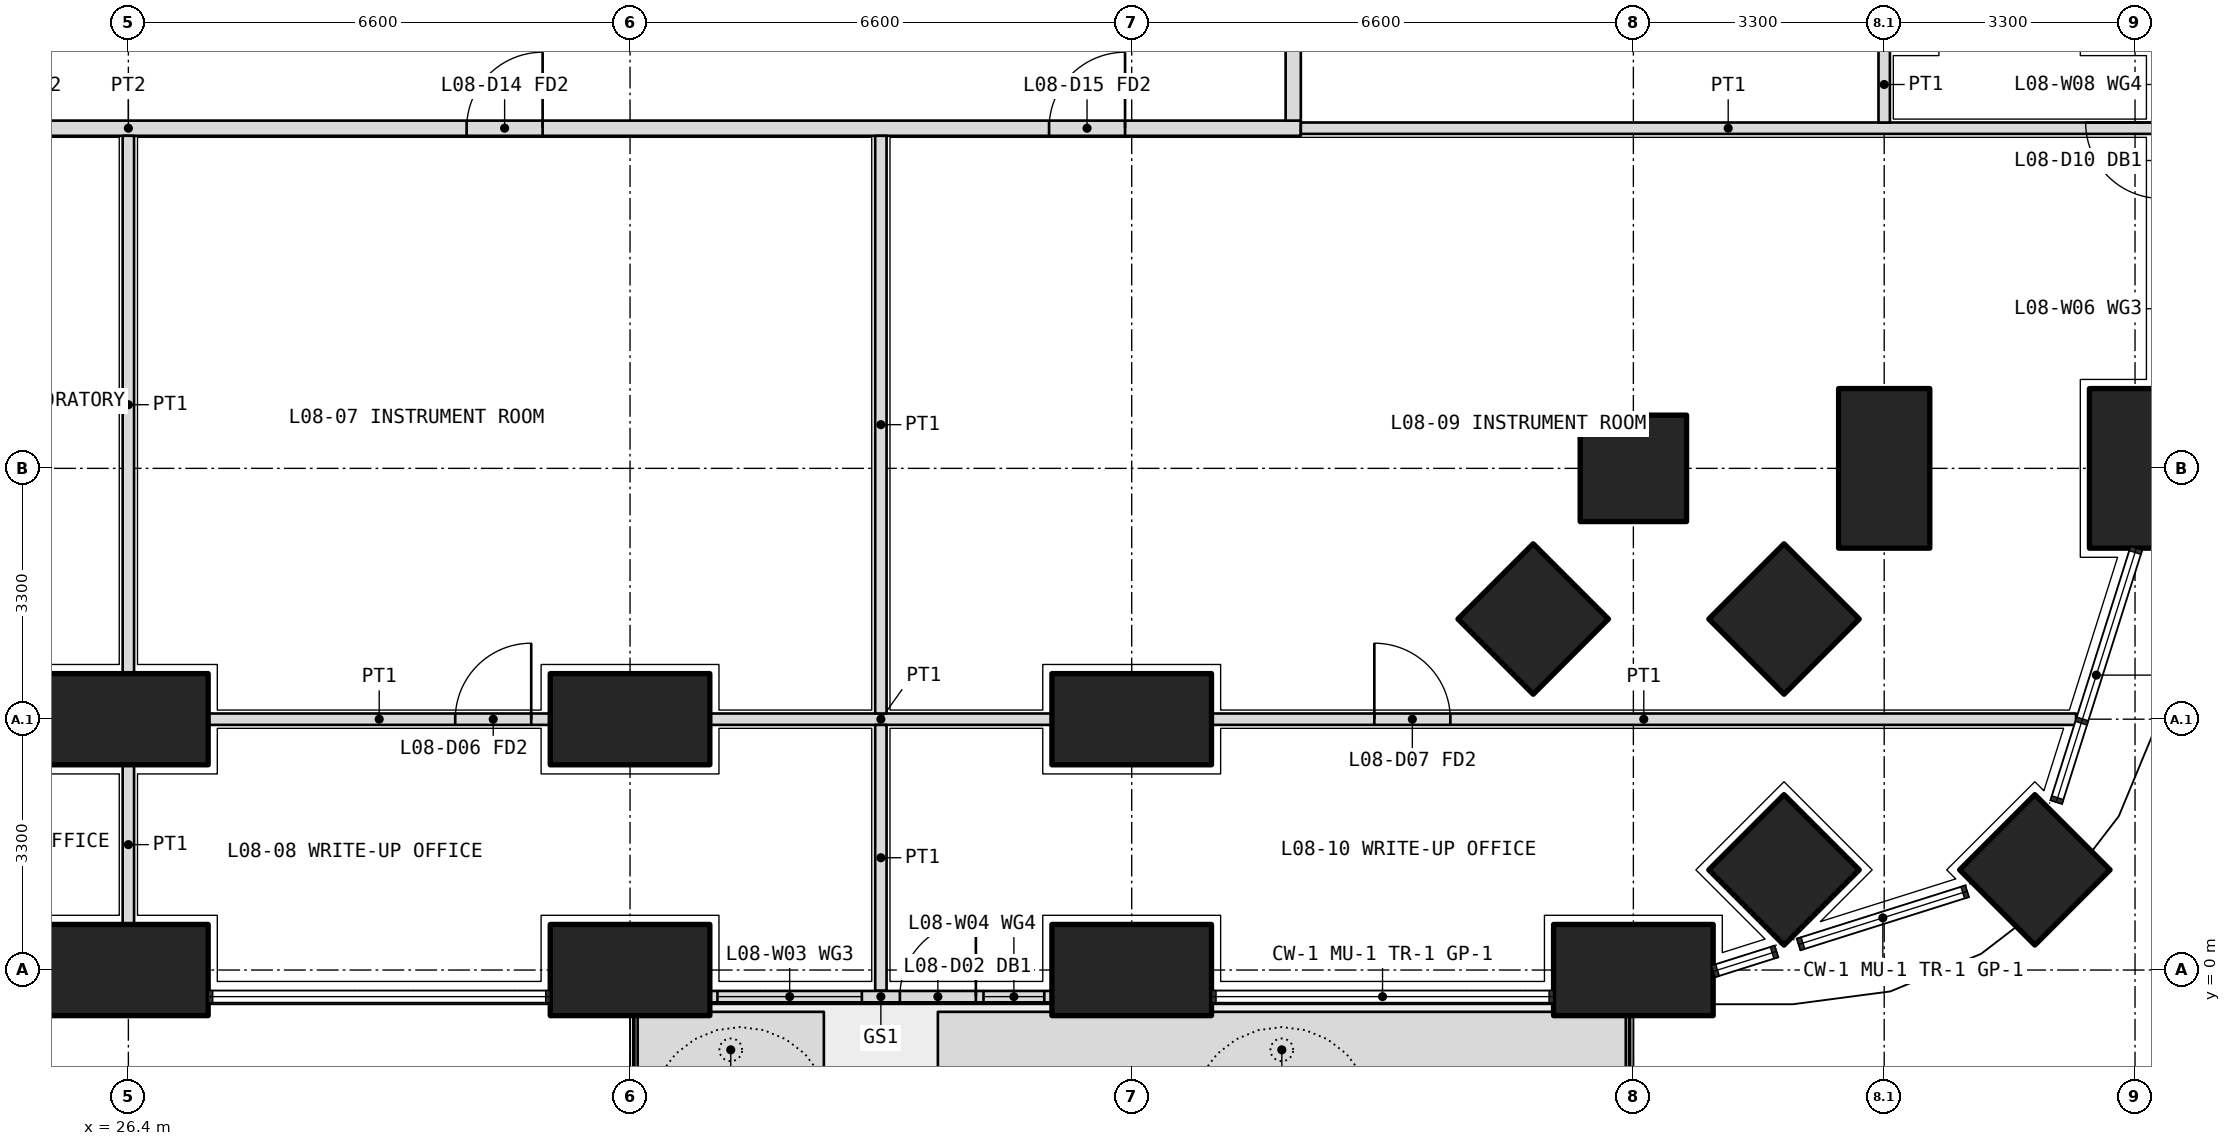
"""IFC4 building model, lengths in metres.
Left out: names, types, materials, properties, quantities, classifications, styles, units other than length and angle.
Written with IfcOpenShell. Run it as: python <this file> out.ifc"""

import sys

from ifc_helpers import new_model, si_unit, direction, frame, frame_2d, origin, origin_2d, place, context, subcontext, project, spatial, polyline, rectangle, outline, extrude, element, fill, save


model = new_model("IFC4")
c1 = context("Model", 3, precision=1e-05, world=origin(), true_north=direction((0.0, 1.0)))
c2 = subcontext(c1, "Body", "Model", "MODEL_VIEW")
j1 = project(units=[si_unit("LENGTHUNIT", "METRE"), si_unit("PLANEANGLEUNIT", "RADIAN")], contexts=[c1])
p1 = place(None, origin())
s1 = spatial("IfcSite", under=j1, at=p1, CompositionType="ELEMENT")
p2 = place(p1, origin())
s2 = spatial("IfcBuilding", under=s1, at=p2, CompositionType="ELEMENT")
p3 = place(p2, frame((0.0, 0.0, 38.1)))
s3 = spatial("IfcBuildingStorey", under=s2, at=p3, CompositionType="ELEMENT", Elevation=38.1)
p4 = place(p3, frame((51.482, 1.318, 0.0), z_axis=(0.0, 0.0, 1.0), x_axis=(0.707106781187, 0.707106781187, 0.0)))
e1 = element("IfcColumn", 1, at=p4, inside=s3, PredefinedType="COLUMN", context=c2, shape_type="SweptSolid", body=[
    extrude(rectangle(XDim=1.4, YDim=1.4, at=origin_2d()), origin(), (0.0, 0.0, 1.0), 4.2),
])
for number, where, z_axis, x_axis in (
    (2, (26.4, 0.0, 0.0), (0.0, 0.0, 1.0), (1.0, 0.0, 0.0)),
    (3, (33.0, 0.0, 0.0), (0.0, 0.0, 1.0), (1.0, 0.0, 0.0)),
    (4, (39.6, 0.0, 0.0), (0.0, 0.0, 1.0), (1.0, 0.0, 0.0)),
    (5, (46.2, 0.0, 0.0), (0.0, 0.0, 1.0), (1.0, 0.0, 0.0)),
    (6, (52.8, 6.6, 0.0), (0.0, 0.0, 1.0), (0.0, 1.0, 0.0)),
):
    element("IfcColumn", number, at=place(p3, frame(where, z_axis=z_axis, x_axis=x_axis)), inside=s3, PredefinedType="COLUMN", context=c2, shape_type="SweptSolid", body=[
        extrude(rectangle(XDim=2.1, YDim=1.2, at=origin_2d()), origin(), (0.0, 0.0, 1.0), 4.2),
    ])
for number, where, z_axis, x_axis in (
    (7, (46.2, 6.6, 0.0), (0.0, 0.0, 1.0), (1.0, 0.0, 0.0)),
    (8, (48.182, 1.318, 0.0), (0.0, 0.0, 1.0), (0.707, 0.707, 0.0)),
):
    element("IfcColumn", number, at=place(p3, frame(where, z_axis=z_axis, x_axis=x_axis)), inside=s3, PredefinedType="COLUMN", context=c2, shape_type="SweptSolid", body=[
        extrude(rectangle(XDim=1.4, YDim=1.4, at=origin_2d()), origin(), (0.0, 0.0, 1.0), 4.2),
    ])
p5 = place(p3, frame((49.5, 6.6, 0.0), z_axis=(0.0, 0.0, 1.0), x_axis=(0.0, 1.0, 0.0)))
e9 = element("IfcColumn", 9, at=p5, inside=s3, PredefinedType="COLUMN", context=c2, shape_type="SweptSolid", body=[
    extrude(rectangle(XDim=2.1, YDim=1.2, at=origin_2d()), origin(), (0.0, 0.0, 1.0), 4.2),
])
p6 = place(p3, frame((48.182, 4.618, 0.0), z_axis=(0.0, 0.0, 1.0), x_axis=(0.707106781187, 0.707106781187, 0.0)))
e10 = element("IfcColumn", 10, at=p6, inside=s3, PredefinedType="COLUMN", context=c2, shape_type="SweptSolid", body=[
    extrude(rectangle(XDim=1.4, YDim=1.4, at=origin_2d()), origin(), (0.0, 0.0, 1.0), 4.2),
])
for number, where, z_axis, x_axis in (
    (11, (26.4, 3.3, 0.0), (0.0, 0.0, 1.0), (1.0, 0.0, 0.0)),
    (12, (33.0, 3.3, 0.0), (0.0, 0.0, 1.0), (1.0, 0.0, 0.0)),
    (13, (39.6, 3.3, 0.0), (0.0, 0.0, 1.0), (1.0, 0.0, 0.0)),
):
    element("IfcColumn", number, at=place(p3, frame(where, z_axis=z_axis, x_axis=x_axis)), inside=s3, PredefinedType="COLUMN", context=c2, shape_type="SweptSolid", body=[
        extrude(rectangle(XDim=2.1, YDim=1.2, at=origin_2d()), origin(), (0.0, 0.0, 1.0), 4.2),
    ])
p7 = place(p3, frame((44.882, 4.618, 0.0), z_axis=(0.0, 0.0, 1.0), x_axis=(0.707106781187, 0.707106781187, 0.0)))
e14 = element("IfcColumn", 14, at=p7, inside=s3, PredefinedType="COLUMN", context=c2, shape_type="SweptSolid", body=[
    extrude(rectangle(XDim=1.4, YDim=1.4, at=origin_2d()), origin(), (0.0, 0.0, 1.0), 4.2),
])
p8 = place(p3, origin())
e15 = element("IfcWall", 15, at=p8, inside=s3, PredefinedType="USERDEFINED", context=c2, shape_type="SweptSolid", body=[
    extrude(outline(polyline([(33.1, -1.55), (35.55, -1.55), (35.55, -0.55), (33.1, -0.55), (33.1, -1.55)]), holes=[polyline([(33.25, -1.4), (35.4, -1.4), (35.4, -0.7), (33.25, -0.7), (33.25, -1.4)])]), origin(), (0.0, 0.0, 1.0), 1.05),
])
p9 = place(p3, origin())
e16 = element("IfcWall", 16, at=p9, inside=s3, PredefinedType="USERDEFINED", context=c2, shape_type="SweptSolid", body=[
    extrude(outline(polyline([(37.05, -1.55), (46.1, -1.55), (46.1, -0.55), (37.05, -0.55), (37.05, -1.55)]), holes=[polyline([(37.2, -1.4), (45.95, -1.4), (45.95, -0.7), (37.2, -0.7), (37.2, -1.4)])]), origin(), (0.0, 0.0, 1.0), 1.05),
])
p10 = place(p3, frame((34.05, -0.35, 0.0), z_axis=(0.0, 0.0, 1.0), x_axis=(1.0, 0.0, 0.0)))
e17 = element("IfcWall", 17, at=p10, inside=s3, PredefinedType="SOLIDWALL", context=c2, shape_type="SweptSolid", body=[
    extrude(rectangle(XDim=4.5, YDim=0.15, at=frame_2d((2.25, 0.0))), origin(), (0.0, 0.0, 1.0), 2.7),
])
p11 = place(p10, frame((2.5, 0.0, 0.0)))
e18 = element("IfcOpeningElement", 18, at=p11, cuts=e17, PredefinedType="OPENING", context=c2, shape_type="SweptSolid", body=[
    extrude(rectangle(XDim=1.0, YDim=2.4, at=frame_2d((0.5, 1.2))), frame((0.0, 0.085, 0.0), z_axis=(0.0, -1.0, 0.0), x_axis=(1.0, 0.0, 0.0)), (0.0, 0.0, 1.0), 0.17),
])
p12 = place(p10, frame((0.1, 0.0, 0.1)))
e19 = element("IfcOpeningElement", 19, at=p12, cuts=e17, PredefinedType="OPENING", context=c2, shape_type="SweptSolid", body=[
    extrude(rectangle(XDim=1.9, YDim=2.3, at=frame_2d((0.95, 1.15))), frame((0.0, 0.085, 0.0), z_axis=(0.0, -1.0, 0.0), x_axis=(1.0, 0.0, 0.0)), (0.0, 0.0, 1.0), 0.17),
])
p13 = place(p10, frame((3.6, 0.0, 0.1)))
e20 = element("IfcOpeningElement", 20, at=p13, cuts=e17, PredefinedType="OPENING", context=c2, shape_type="SweptSolid", body=[
    extrude(rectangle(XDim=0.8, YDim=2.3, at=frame_2d((0.4, 1.15))), frame((0.0, 0.085, 0.0), z_axis=(0.0, -1.0, 0.0), x_axis=(1.0, 0.0, 0.0)), (0.0, 0.0, 1.0), 0.17),
])
p14 = place(p3, frame((10.975, 11.075, 0.0), z_axis=(0.0, 0.0, 1.0), x_axis=(1.0, 0.0, 0.0)))
e21 = element("IfcWall", 21, at=p14, inside=s3, PredefinedType="PARTITIONING", context=c2, shape_type="SweptSolid", body=[
    extrude(rectangle(XDim=30.85, YDim=0.2, at=frame_2d((15.425, 0.0))), origin(), (0.0, 0.0, 1.0), 2.85),
])
p15 = place(p14, frame((2.312, 0.0, 0.0)))
e22 = element("IfcOpeningElement", 22, at=p15, cuts=e21, PredefinedType="OPENING", context=c2, shape_type="SweptSolid", body=[
    extrude(rectangle(XDim=1.0, YDim=2.1, at=frame_2d((0.5, 1.05))), frame((0.0, 0.11, 0.0), z_axis=(0.0, -1.0, 0.0), x_axis=(1.0, 0.0, 0.0)), (0.0, 0.0, 1.0), 0.22),
])
p16 = place(p14, frame((8.325, 0.0, 0.0)))
e23 = element("IfcOpeningElement", 23, at=p16, cuts=e21, PredefinedType="OPENING", context=c2, shape_type="SweptSolid", body=[
    extrude(rectangle(XDim=1.0, YDim=2.1, at=frame_2d((0.5, 1.05))), frame((0.0, 0.11, 0.0), z_axis=(0.0, -1.0, 0.0), x_axis=(1.0, 0.0, 0.0)), (0.0, 0.0, 1.0), 0.22),
])
p17 = place(p14, frame((13.175, 0.0, 0.0)))
e24 = element("IfcOpeningElement", 24, at=p17, cuts=e21, PredefinedType="OPENING", context=c2, shape_type="SweptSolid", body=[
    extrude(rectangle(XDim=1.2, YDim=2.1, at=frame_2d((0.6, 1.05))), frame((0.0, 0.11, 0.0), z_axis=(0.0, -1.0, 0.0), x_axis=(1.0, 0.0, 0.0)), (0.0, 0.0, 1.0), 0.22),
])
p18 = place(p14, frame((19.875, 0.0, 0.0)))
e25 = element("IfcOpeningElement", 25, at=p18, cuts=e21, PredefinedType="OPENING", context=c2, shape_type="SweptSolid", body=[
    extrude(rectangle(XDim=1.0, YDim=2.1, at=frame_2d((0.5, 1.05))), frame((0.0, 0.11, 0.0), z_axis=(0.0, -1.0, 0.0), x_axis=(1.0, 0.0, 0.0)), (0.0, 0.0, 1.0), 0.22),
])
p19 = place(p14, frame((27.538, 0.0, 0.0)))
e26 = element("IfcOpeningElement", 26, at=p19, cuts=e21, PredefinedType="OPENING", context=c2, shape_type="SweptSolid", body=[
    extrude(rectangle(XDim=1.0, YDim=2.1, at=frame_2d((0.5, 1.05))), frame((0.0, 0.11, 0.0), z_axis=(0.0, -1.0, 0.0), x_axis=(1.0, 0.0, 0.0)), (0.0, 0.0, 1.0), 0.22),
])
p20 = place(p3, frame((41.725, 11.175, 0.0), z_axis=(0.0, 0.0, 1.0), x_axis=(0.0, 1.0, 0.0)))
e27 = element("IfcWall", 27, at=p20, inside=s3, PredefinedType="PARTITIONING", context=c2, shape_type="SweptSolid", body=[
    extrude(rectangle(XDim=23.85, YDim=0.2, at=frame_2d((11.925, 0.0))), origin(), (0.0, 0.0, 1.0), 2.85),
])
p21 = place(p20, frame((2.113, 0.0, 0.0)))
e28 = element("IfcOpeningElement", 28, at=p21, cuts=e27, PredefinedType="OPENING", context=c2, shape_type="SweptSolid", body=[
    extrude(rectangle(XDim=1.0, YDim=2.1, at=frame_2d((0.5, 1.05))), frame((0.0, 0.11, 0.0), z_axis=(0.0, -1.0, 0.0), x_axis=(1.0, 0.0, 0.0)), (0.0, 0.0, 1.0), 0.22),
])
p22 = place(p20, frame((6.475, 0.0, 0.0)))
e29 = element("IfcOpeningElement", 29, at=p22, cuts=e27, PredefinedType="OPENING", context=c2, shape_type="SweptSolid", body=[
    extrude(rectangle(XDim=1.0, YDim=2.1, at=frame_2d((0.5, 1.05))), frame((0.0, 0.11, 0.0), z_axis=(0.0, -1.0, 0.0), x_axis=(1.0, 0.0, 0.0)), (0.0, 0.0, 1.0), 0.22),
])
p23 = place(p20, frame((9.625, 0.0, 0.0)))
e30 = element("IfcOpeningElement", 30, at=p23, cuts=e27, PredefinedType="OPENING", context=c2, shape_type="SweptSolid", body=[
    extrude(rectangle(XDim=1.0, YDim=2.1, at=frame_2d((0.5, 1.05))), frame((0.0, 0.11, 0.0), z_axis=(0.0, -1.0, 0.0), x_axis=(1.0, 0.0, 0.0)), (0.0, 0.0, 1.0), 0.22),
])
p24 = place(p20, frame((12.975, 0.0, 0.0)))
e31 = element("IfcOpeningElement", 31, at=p24, cuts=e27, PredefinedType="OPENING", context=c2, shape_type="SweptSolid", body=[
    extrude(rectangle(XDim=0.9, YDim=2.1, at=frame_2d((0.45, 1.05))), frame((0.0, 0.11, 0.0), z_axis=(0.0, -1.0, 0.0), x_axis=(1.0, 0.0, 0.0)), (0.0, 0.0, 1.0), 0.22),
])
p25 = place(p20, frame((19.087, 0.0, 0.0)))
e32 = element("IfcOpeningElement", 32, at=p25, cuts=e27, PredefinedType="OPENING", context=c2, shape_type="SweptSolid", body=[
    extrude(rectangle(XDim=1.0, YDim=2.1, at=frame_2d((0.5, 1.05))), frame((0.0, 0.11, 0.0), z_axis=(0.0, -1.0, 0.0), x_axis=(1.0, 0.0, 0.0)), (0.0, 0.0, 1.0), 0.22),
])
p26 = place(p3, frame((53.07, 11.075, 0.0), z_axis=(0.0, 0.0, 1.0), x_axis=(-1.0, 0.0, 0.0)))
e33 = element("IfcWall", 33, at=p26, inside=s3, PredefinedType="PARTITIONING", context=c2, shape_type="SweptSolid", body=[
    extrude(rectangle(XDim=11.245, YDim=0.15, at=frame_2d((5.623, 0.0))), origin(), (0.0, 0.0, 1.0), 2.7),
])
p27 = place(p3, frame((27.45, 3.3, 0.0), z_axis=(0.0, 0.0, 1.0), x_axis=(1.0, 0.0, 0.0)))
e34 = element("IfcWall", 34, at=p27, inside=s3, PredefinedType="PARTITIONING", context=c2, shape_type="SweptSolid", body=[
    extrude(rectangle(XDim=4.5, YDim=0.15, at=frame_2d((2.25, 0.0))), origin(), (0.0, 0.0, 1.0), 3.9),
])
p28 = place(p27, frame((3.25, 0.0, 0.0)))
e35 = element("IfcOpeningElement", 35, at=p28, cuts=e34, PredefinedType="OPENING", context=c2, shape_type="SweptSolid", body=[
    extrude(rectangle(XDim=1.0, YDim=2.1, at=frame_2d((0.5, 1.05))), frame((0.0, 0.085, 0.0), z_axis=(0.0, -1.0, 0.0), x_axis=(1.0, 0.0, 0.0)), (0.0, 0.0, 1.0), 0.17),
])
p29 = place(p3, frame((34.05, 3.3, 0.0), z_axis=(0.0, 0.0, 1.0), x_axis=(1.0, 0.0, 0.0)))
e36 = element("IfcWall", 36, at=p29, inside=s3, PredefinedType="PARTITIONING", context=c2, shape_type="SweptSolid", body=[
    extrude(rectangle(XDim=4.5, YDim=0.15, at=frame_2d((2.25, 0.0))), origin(), (0.0, 0.0, 1.0), 3.9),
])
p30 = place(p3, frame((40.65, 3.3, 0.0), z_axis=(0.0, 0.0, 1.0), x_axis=(1.0, 0.0, 0.0)))
e37 = element("IfcWall", 37, at=p30, inside=s3, PredefinedType="PARTITIONING", context=c2, shape_type="SweptSolid", body=[
    extrude(rectangle(XDim=11.374, YDim=0.15, at=frame_2d((5.687, 0.0))), origin(), (0.0, 0.0, 1.0), 2.7),
])
p31 = place(p30, frame((2.142, 0.0, 0.0)))
e38 = element("IfcOpeningElement", 38, at=p31, cuts=e37, PredefinedType="OPENING", context=c2, shape_type="SweptSolid", body=[
    extrude(rectangle(XDim=1.0, YDim=2.1, at=frame_2d((0.5, 1.05))), frame((0.0, 0.085, 0.0), z_axis=(0.0, -1.0, 0.0), x_axis=(1.0, 0.0, 0.0)), (0.0, 0.0, 1.0), 0.17),
])
p32 = place(p3, frame((26.4, 0.6, 0.0), z_axis=(0.0, 0.0, 1.0), x_axis=(0.0, 1.0, 0.0)))
e39 = element("IfcWall", 39, at=p32, inside=s3, PredefinedType="PARTITIONING", context=c2, shape_type="SweptSolid", body=[
    extrude(rectangle(XDim=2.1, YDim=0.15, at=frame_2d((1.05, 0.0))), origin(), (0.0, 0.0, 1.0), 2.85),
])
p33 = place(p3, frame((26.4, 3.9, 0.0), z_axis=(0.0, 0.0, 1.0), x_axis=(0.0, 1.0, 0.0)))
e40 = element("IfcWall", 40, at=p33, inside=s3, PredefinedType="PARTITIONING", context=c2, shape_type="SweptSolid", body=[
    extrude(rectangle(XDim=7.075, YDim=0.15, at=frame_2d((3.538, 0.0))), origin(), (0.0, 0.0, 1.0), 2.85),
])
p34 = place(p3, frame((36.3, -0.27, 0.0), z_axis=(0.0, 0.0, 1.0), x_axis=(0.0, 1.0, 0.0)))
e41 = element("IfcWall", 41, at=p34, inside=s3, PredefinedType="PARTITIONING", context=c2, shape_type="SweptSolid", body=[
    extrude(rectangle(XDim=3.495, YDim=0.15, at=frame_2d((1.748, 0.0))), origin(), (0.0, 0.0, 1.0), 2.7),
])
p35 = place(p3, frame((36.3, 3.375, 0.0), z_axis=(0.0, 0.0, 1.0), x_axis=(0.0, 1.0, 0.0)))
e42 = element("IfcWall", 42, at=p35, inside=s3, PredefinedType="PARTITIONING", context=c2, shape_type="SweptSolid", body=[
    extrude(rectangle(XDim=7.6, YDim=0.15, at=frame_2d((3.8, 0.0))), origin(), (0.0, 0.0, 1.0), 3.9),
])
p36 = place(p3, frame((49.5, 11.15, 0.0), z_axis=(0.0, 0.0, 1.0), x_axis=(0.0, 1.0, 0.0)))
e43 = element("IfcWall", 43, at=p36, inside=s3, PredefinedType="PARTITIONING", context=c2, shape_type="SweptSolid", body=[
    extrude(rectangle(XDim=1.0, YDim=0.15, at=frame_2d((0.5, 0.0))), origin(), (0.0, 0.0, 1.0), 3.9),
])
p37 = place(p11, origin())
e44 = element("IfcDoor", 44, at=p37, inside=s3, OperationType="SINGLE_SWING_RIGHT", PredefinedType="DOOR", context=c2, shape_type="SweptSolid", body=[
    extrude(rectangle(XDim=1.0, YDim=2.4, at=frame_2d((0.5, 1.2))), frame((0.0, 0.025, 0.0), z_axis=(0.0, -1.0, 0.0), x_axis=(1.0, 0.0, 0.0)), (0.0, 0.0, 1.0), 0.05),
])
fill(e18, e44)
p38 = place(p12, origin())
e45 = element("IfcWindow", 45, at=p38, inside=s3, PartitioningType="SINGLE_PANEL", PredefinedType="WINDOW", context=c2, shape_type="SweptSolid", body=[
    extrude(rectangle(XDim=1.9, YDim=2.3, at=frame_2d((0.95, 1.15))), frame((0.0, 0.03, 0.0), z_axis=(0.0, -1.0, 0.0), x_axis=(1.0, 0.0, 0.0)), (0.0, 0.0, 1.0), 0.06),
])
fill(e19, e45)
p39 = place(p13, origin())
e46 = element("IfcWindow", 46, at=p39, inside=s3, PartitioningType="SINGLE_PANEL", PredefinedType="WINDOW", context=c2, shape_type="SweptSolid", body=[
    extrude(rectangle(XDim=0.8, YDim=2.3, at=frame_2d((0.4, 1.15))), frame((0.0, 0.03, 0.0), z_axis=(0.0, -1.0, 0.0), x_axis=(1.0, 0.0, 0.0)), (0.0, 0.0, 1.0), 0.06),
])
fill(e20, e46)
p40 = place(p18, origin())
e47 = element("IfcDoor", 47, at=p40, inside=s3, OperationType="SINGLE_SWING_RIGHT", PredefinedType="DOOR", context=c2, shape_type="SweptSolid", body=[
    extrude(rectangle(XDim=1.0, YDim=2.1, at=frame_2d((0.5, 1.05))), frame((0.0, 0.025, 0.0), z_axis=(0.0, -1.0, 0.0), x_axis=(1.0, 0.0, 0.0)), (0.0, 0.0, 1.0), 0.05),
])
fill(e25, e47)
p41 = place(p28, origin())
e48 = element("IfcDoor", 48, at=p41, inside=s3, OperationType="SINGLE_SWING_RIGHT", PredefinedType="DOOR", context=c2, shape_type="SweptSolid", body=[
    extrude(rectangle(XDim=1.0, YDim=2.1, at=frame_2d((0.5, 1.05))), frame((0.0, 0.025, 0.0), z_axis=(0.0, -1.0, 0.0), x_axis=(1.0, 0.0, 0.0)), (0.0, 0.0, 1.0), 0.05),
])
fill(e35, e48)
p42 = place(p19, origin())
e49 = element("IfcDoor", 49, at=p42, inside=s3, OperationType="SINGLE_SWING_RIGHT", PredefinedType="DOOR", context=c2, shape_type="SweptSolid", body=[
    extrude(rectangle(XDim=1.0, YDim=2.1, at=frame_2d((0.5, 1.05))), frame((0.0, 0.025, 0.0), z_axis=(0.0, -1.0, 0.0), x_axis=(1.0, 0.0, 0.0)), (0.0, 0.0, 1.0), 0.05),
])
fill(e26, e49)
p43 = place(p31, origin())
e50 = element("IfcDoor", 50, at=p43, inside=s3, OperationType="SINGLE_SWING_LEFT", PredefinedType="DOOR", context=c2, shape_type="SweptSolid", body=[
    extrude(rectangle(XDim=1.0, YDim=2.1, at=frame_2d((0.5, 1.05))), frame((0.0, 0.025, 0.0), z_axis=(0.0, -1.0, 0.0), x_axis=(1.0, 0.0, 0.0)), (0.0, 0.0, 1.0), 0.05),
])
fill(e38, e50)
save(model, sys.argv[1])
